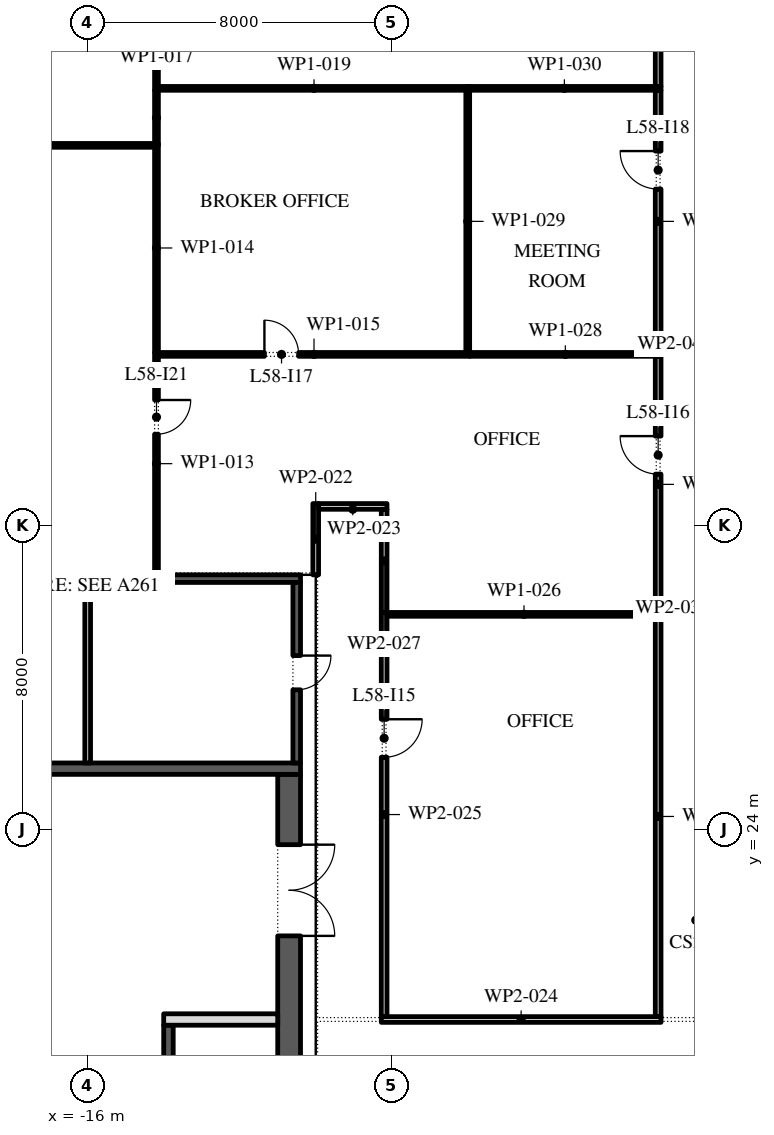
"""IFC4 building model, lengths in metres.
Left out: names, types, materials, properties, quantities, classifications, styles, units other than length and angle.
Written with IfcOpenShell. Run it as: python <this file> out.ifc"""

import sys

from ifc_helpers import new_model, si_unit, direction, frame, frame_2d, origin, place, context, subcontext, project, spatial, rectangle, extrude, element, fill, save


model = new_model("IFC4")
c1 = context("Model", 3, precision=1e-05, world=origin(), true_north=direction((0.0, 1.0)))
c2 = subcontext(c1, "Body", "Model", "MODEL_VIEW")
j1 = project(units=[si_unit("LENGTHUNIT", "METRE"), si_unit("PLANEANGLEUNIT", "RADIAN")], contexts=[c1])
p1 = place(None, origin())
s1 = spatial("IfcSite", under=j1, at=p1, CompositionType="ELEMENT")
p2 = place(p1, origin())
s2 = spatial("IfcBuilding", under=s1, at=p2, CompositionType="ELEMENT")
p3 = place(p2, frame((0.0, 0.0, 268.2)))
s3 = spatial("IfcBuildingStorey", under=s2, at=p3, CompositionType="ELEMENT", Elevation=268.2)
p4 = place(p3, frame((29.616, 40.758, 0.0), z_axis=(0.0, 0.0, 1.0), x_axis=(-0.974370532314, 0.224949029246, 0.0)))
e1 = element("IfcWall", 1, at=p4, inside=s3, PredefinedType="STANDARD", context=c2, shape_type="SweptSolid", body=[
    extrude(rectangle(XDim=48.0, YDim=0.3, at=frame_2d((24.0, 0.0))), origin(), (0.0, 0.0, 1.0), 4.0),
])
p5 = place(p4, frame((1.625, 0.0, 0.45)))
e2 = element("IfcOpeningElement", 2, at=p5, cuts=e1, PredefinedType="OPENING", context=c2, shape_type="SweptSolid", body=[
    extrude(rectangle(XDim=4.5, YDim=2.575, at=frame_2d((2.25, 1.288))), frame((0.0, 0.16, 0.0), z_axis=(0.0, -1.0, 0.0), x_axis=(1.0, 0.0, 0.0)), (0.0, 0.0, 1.0), 0.32),
])
p6 = place(p4, frame((10.575, 0.0, 0.0)))
e3 = element("IfcOpeningElement", 3, at=p6, cuts=e1, PredefinedType="OPENING", context=c2, shape_type="SweptSolid", body=[
    extrude(rectangle(XDim=2.4, YDim=3.5, at=frame_2d((1.2, 1.75))), frame((0.0, 0.16, 0.0), z_axis=(0.0, -1.0, 0.0), x_axis=(1.0, 0.0, 0.0)), (0.0, 0.0, 1.0), 0.32),
])
p7 = place(p4, frame((17.575, 0.0, 0.45)))
e4 = element("IfcOpeningElement", 4, at=p7, cuts=e1, PredefinedType="OPENING", context=c2, shape_type="SweptSolid", body=[
    extrude(rectangle(XDim=4.5, YDim=2.45, at=frame_2d((2.25, 1.225))), frame((0.0, 0.16, 0.0), z_axis=(0.0, -1.0, 0.0), x_axis=(1.0, 0.0, 0.0)), (0.0, 0.0, 1.0), 0.32),
])
p8 = place(p4, frame((25.625, 0.0, 0.45)))
e5 = element("IfcOpeningElement", 5, at=p8, cuts=e1, PredefinedType="OPENING", context=c2, shape_type="SweptSolid", body=[
    extrude(rectangle(XDim=4.5, YDim=2.45, at=frame_2d((2.25, 1.225))), frame((0.0, 0.16, 0.0), z_axis=(0.0, -1.0, 0.0), x_axis=(1.0, 0.0, 0.0)), (0.0, 0.0, 1.0), 0.32),
])
p9 = place(p4, frame((33.675, 0.0, 0.45)))
e6 = element("IfcOpeningElement", 6, at=p9, cuts=e1, PredefinedType="OPENING", context=c2, shape_type="SweptSolid", body=[
    extrude(rectangle(XDim=4.5, YDim=2.45, at=frame_2d((2.25, 1.225))), frame((0.0, 0.16, 0.0), z_axis=(0.0, -1.0, 0.0), x_axis=(1.0, 0.0, 0.0)), (0.0, 0.0, 1.0), 0.32),
])
p10 = place(p4, frame((42.175, 0.0, 0.0)))
e7 = element("IfcOpeningElement", 7, at=p10, cuts=e1, PredefinedType="OPENING", context=c2, shape_type="SweptSolid", body=[
    extrude(rectangle(XDim=2.4, YDim=3.5, at=frame_2d((1.2, 1.75))), frame((0.0, 0.16, 0.0), z_axis=(0.0, -1.0, 0.0), x_axis=(1.0, 0.0, 0.0)), (0.0, 0.0, 1.0), 0.32),
])
p11 = place(p3, frame((-10.7, -2.45, 0.0), z_axis=(0.0, 0.0, 1.0), x_axis=(0.0, 1.0, 0.0)))
e8 = element("IfcWall", 8, at=p11, inside=s3, PredefinedType="SHEAR", context=c2, shape_type="SweptSolid", body=[
    extrude(rectangle(XDim=27.9, YDim=0.6, at=frame_2d((13.95, 0.0))), origin(), (0.0, 0.0, 1.0), 4.0),
])
p12 = place(p11, frame((23.65, 0.0, 0.0)))
e9 = element("IfcOpeningElement", 9, at=p12, cuts=e8, PredefinedType="OPENING", context=c2, shape_type="SweptSolid", body=[
    extrude(rectangle(XDim=2.4, YDim=2.1, at=frame_2d((1.2, 1.05))), frame((0.0, 0.31, 0.0), z_axis=(0.0, -1.0, 0.0), x_axis=(1.0, 0.0, 0.0)), (0.0, 0.0, 1.0), 0.62),
])
p13 = place(p11, frame((1.087, 0.0, 0.0)))
e10 = element("IfcOpeningElement", 10, at=p13, cuts=e8, PredefinedType="OPENING", context=c2, shape_type="SweptSolid", body=[
    extrude(rectangle(XDim=0.9, YDim=2.1, at=frame_2d((0.45, 1.05))), frame((0.0, 0.31, 0.0), z_axis=(0.0, -1.0, 0.0), x_axis=(1.0, 0.0, 0.0)), (0.0, 0.0, 1.0), 0.62),
])
p14 = place(p11, frame((4.262, 0.0, 0.0)))
e11 = element("IfcOpeningElement", 11, at=p14, cuts=e8, PredefinedType="OPENING", context=c2, shape_type="SweptSolid", body=[
    extrude(rectangle(XDim=1.0, YDim=2.1, at=frame_2d((0.5, 1.05))), frame((0.0, 0.31, 0.0), z_axis=(0.0, -1.0, 0.0), x_axis=(1.0, 0.0, 0.0)), (0.0, 0.0, 1.0), 0.62),
])
p15 = place(p3, frame((-21.6, 25.6, 0.0), z_axis=(0.0, 0.0, 1.0), x_axis=(1.0, 0.0, 0.0)))
e12 = element("IfcWall", 12, at=p15, inside=s3, PredefinedType="SHEAR", context=c2, shape_type="SweptSolid", body=[
    extrude(rectangle(XDim=11.2, YDim=0.3, at=frame_2d((5.6, 0.0))), origin(), (0.0, 0.0, 1.0), 4.0),
])
p16 = place(p3, frame((-13.875, -2.45, 0.0), z_axis=(0.0, 0.0, 1.0), x_axis=(0.0, 1.0, 0.0)))
e13 = element("IfcWall", 13, at=p16, inside=s3, PredefinedType="SHEAR", context=c2, shape_type="SweptSolid", body=[
    extrude(rectangle(XDim=21.3, YDim=0.25, at=frame_2d((10.65, 0.0))), origin(), (0.0, 0.0, 1.0), 4.0),
])
p17 = place(p16, frame((16.261, 0.0, 0.0)))
e14 = element("IfcOpeningElement", 14, at=p17, cuts=e13, PredefinedType="OPENING", context=c2, shape_type="SweptSolid", body=[
    extrude(rectangle(XDim=0.9, YDim=2.1, at=frame_2d((0.45, 1.05))), frame((0.0, 0.135, 0.0), z_axis=(0.0, -1.0, 0.0), x_axis=(1.0, 0.0, 0.0)), (0.0, 0.0, 1.0), 0.27),
])
p18 = place(p16, frame((19.325, 0.0, 0.0)))
e15 = element("IfcOpeningElement", 15, at=p18, cuts=e13, PredefinedType="OPENING", context=c2, shape_type="SweptSolid", body=[
    extrude(rectangle(XDim=0.9, YDim=2.1, at=frame_2d((0.45, 1.05))), frame((0.0, 0.135, 0.0), z_axis=(0.0, -1.0, 0.0), x_axis=(1.0, 0.0, 0.0)), (0.0, 0.0, 1.0), 0.27),
])
p19 = place(p16, frame((6.971, 0.0, 0.0)))
e16 = element("IfcOpeningElement", 16, at=p19, cuts=e13, PredefinedType="OPENING", context=c2, shape_type="SweptSolid", body=[
    extrude(rectangle(XDim=1.1, YDim=2.1, at=frame_2d((0.55, 1.05))), frame((0.0, 0.135, 0.0), z_axis=(0.0, -1.0, 0.0), x_axis=(1.0, 0.0, 0.0)), (0.0, 0.0, 1.0), 0.27),
])
p20 = place(p16, frame((9.114, 0.0, 0.0)))
e17 = element("IfcOpeningElement", 17, at=p20, cuts=e13, PredefinedType="OPENING", context=c2, shape_type="SweptSolid", body=[
    extrude(rectangle(XDim=1.1, YDim=2.1, at=frame_2d((0.55, 1.05))), frame((0.0, 0.135, 0.0), z_axis=(0.0, -1.0, 0.0), x_axis=(1.0, 0.0, 0.0)), (0.0, 0.0, 1.0), 0.27),
])
p21 = place(p16, frame((11.257, 0.0, 0.0)))
e18 = element("IfcOpeningElement", 18, at=p21, cuts=e13, PredefinedType="OPENING", context=c2, shape_type="SweptSolid", body=[
    extrude(rectangle(XDim=1.1, YDim=2.1, at=frame_2d((0.55, 1.05))), frame((0.0, 0.135, 0.0), z_axis=(0.0, -1.0, 0.0), x_axis=(1.0, 0.0, 0.0)), (0.0, 0.0, 1.0), 0.27),
])
p22 = place(p16, frame((13.4, 0.0, 0.0)))
e19 = element("IfcOpeningElement", 19, at=p22, cuts=e13, PredefinedType="OPENING", context=c2, shape_type="SweptSolid", body=[
    extrude(rectangle(XDim=1.1, YDim=2.1, at=frame_2d((0.55, 1.05))), frame((0.0, 0.135, 0.0), z_axis=(0.0, -1.0, 0.0), x_axis=(1.0, 0.0, 0.0)), (0.0, 0.0, 1.0), 0.27),
])
p23 = place(p3, frame((-14.0, 19.0, 0.0), z_axis=(0.0, 0.0, 1.0), x_axis=(1.0, 0.0, 0.0)))
e20 = element("IfcWall", 20, at=p23, inside=s3, PredefinedType="PARTITIONING", context=c2, shape_type="SweptSolid", body=[
    extrude(rectangle(XDim=3.0, YDim=0.3, at=frame_2d((1.5, 0.0))), origin(), (0.0, 0.0, 1.0), 4.0),
])
p24 = place(p3, frame((-10.5, 25.75, 0.0), z_axis=(0.0, 0.0, 1.0), x_axis=(0.0, 1.0, 0.0)))
e21 = element("IfcWall", 21, at=p24, inside=s3, PredefinedType="SHEAR", context=c2, shape_type="SweptSolid", body=[
    extrude(rectangle(XDim=4.75, YDim=0.2, at=frame_2d((2.375, 0.0))), origin(), (0.0, 0.0, 1.0), 4.0),
])
p25 = place(p24, frame((1.925, 0.0, 0.0)))
e22 = element("IfcOpeningElement", 22, at=p25, cuts=e21, PredefinedType="OPENING", context=c2, shape_type="SweptSolid", body=[
    extrude(rectangle(XDim=0.9, YDim=2.1, at=frame_2d((0.45, 1.05))), frame((0.0, 0.11, 0.0), z_axis=(0.0, -1.0, 0.0), x_axis=(1.0, 0.0, 0.0)), (0.0, 0.0, 1.0), 0.22),
])
p26 = place(p3, frame((-21.6, 30.6, 0.0), z_axis=(0.0, 0.0, 1.0), x_axis=(1.0, 0.0, 0.0)))
e23 = element("IfcWall", 23, at=p26, inside=s3, PredefinedType="SHEAR", context=c2, shape_type="SweptSolid", body=[
    extrude(rectangle(XDim=11.2, YDim=0.2, at=frame_2d((5.6, 0.0))), origin(), (0.0, 0.0, 1.0), 4.0),
])
p27 = place(p3, frame((-16.0, 25.75, 0.0), z_axis=(0.0, 0.0, 1.0), x_axis=(0.0, 1.0, 0.0)))
e24 = element("IfcWall", 24, at=p27, inside=s3, PredefinedType="PARTITIONING", context=c2, shape_type="SweptSolid", body=[
    extrude(rectangle(XDim=4.75, YDim=0.15, at=frame_2d((2.375, 0.0))), origin(), (0.0, 0.0, 1.0), 4.0),
])
p28 = place(p3, frame((-14.19, 30.7, 0.0), z_axis=(0.0, 0.0, 1.0), x_axis=(0.0, 1.0, 0.0)))
e25 = element("IfcWall", 25, at=p28, inside=s3, PredefinedType="PARTITIONING", context=c2, shape_type="SweptSolid", body=[
    extrude(rectangle(XDim=5.85, YDim=0.1, at=frame_2d((2.925, 0.0))), origin(), (0.0, 0.0, 1.0), 4.0),
])
p29 = place(p28, frame((3.7, 0.0, 0.0)))
e26 = element("IfcOpeningElement", 26, at=p29, cuts=e25, PredefinedType="OPENING", context=c2, shape_type="SweptSolid", body=[
    extrude(rectangle(XDim=0.9, YDim=2.1, at=frame_2d((0.45, 1.05))), frame((0.0, 0.06, 0.0), z_axis=(0.0, -1.0, 0.0), x_axis=(1.0, 0.0, 0.0)), (0.0, 0.0, 1.0), 0.12),
])
p30 = place(p3, frame((-14.19, 36.55, 0.0), z_axis=(0.0, 0.0, 1.0), x_axis=(0.0, 1.0, 0.0)))
e27 = element("IfcWall", 27, at=p30, inside=s3, PredefinedType="PARTITIONING", context=c2, shape_type="SweptSolid", body=[
    extrude(rectangle(XDim=5.5, YDim=0.1, at=frame_2d((2.75, 0.0))), origin(), (0.0, 0.0, 1.0), 4.0),
])
p31 = place(p3, frame((-14.14, 36.5, 0.0), z_axis=(0.0, 0.0, 1.0), x_axis=(1.0, 0.0, 0.0)))
e28 = element("IfcWall", 28, at=p31, inside=s3, PredefinedType="PARTITIONING", context=c2, shape_type="SweptSolid", body=[
    extrude(rectangle(XDim=8.19, YDim=0.1, at=frame_2d((4.095, 0.0))), origin(), (0.0, 0.0, 1.0), 4.0),
])
p32 = place(p31, frame((2.79, 0.0, 0.0)))
e29 = element("IfcOpeningElement", 29, at=p32, cuts=e28, PredefinedType="OPENING", context=c2, shape_type="SweptSolid", body=[
    extrude(rectangle(XDim=0.9, YDim=2.1, at=frame_2d((0.45, 1.05))), frame((0.0, 0.06, 0.0), z_axis=(0.0, -1.0, 0.0), x_axis=(1.0, 0.0, 0.0)), (0.0, 0.0, 1.0), 0.12),
])
p33 = place(p3, frame((-14.24, 42.0, 0.0), z_axis=(0.0, 0.0, 1.0), x_axis=(-1.0, 0.0, 0.0)))
e30 = element("IfcWall", 30, at=p33, inside=s3, PredefinedType="PARTITIONING", context=c2, shape_type="SweptSolid", body=[
    extrude(rectangle(XDim=8.589, YDim=0.1, at=frame_2d((4.294, 0.0))), origin(), (0.0, 0.0, 1.0), 4.0),
])
p34 = place(p3, frame((-14.19, 42.0, 0.0), z_axis=(0.0, 0.0, 1.0), x_axis=(0.0, 1.0, 0.0)))
e31 = element("IfcWall", 31, at=p34, inside=s3, PredefinedType="PARTITIONING", context=c2, shape_type="SweptSolid", body=[
    extrude(rectangle(XDim=1.45, YDim=0.1, at=frame_2d((0.725, 0.0))), origin(), (0.0, 0.0, 1.0), 4.0),
])
p35 = place(p3, frame((-14.19, 43.45, 0.0), z_axis=(0.0, 0.0, 1.0), x_axis=(0.0, 1.0, 0.0)))
e32 = element("IfcWall", 32, at=p35, inside=s3, PredefinedType="PARTITIONING", context=c2, shape_type="SweptSolid", body=[
    extrude(rectangle(XDim=7.35, YDim=0.1, at=frame_2d((3.675, 0.0))), origin(), (0.0, 0.0, 1.0), 4.0),
])
p36 = place(p35, frame((1.98, 0.0, 0.0)))
e33 = element("IfcOpeningElement", 33, at=p36, cuts=e32, PredefinedType="OPENING", context=c2, shape_type="SweptSolid", body=[
    extrude(rectangle(XDim=0.9, YDim=2.1, at=frame_2d((0.45, 1.05))), frame((0.0, 0.06, 0.0), z_axis=(0.0, -1.0, 0.0), x_axis=(1.0, 0.0, 0.0)), (0.0, 0.0, 1.0), 0.12),
])
p37 = place(p3, frame((-14.14, 43.5, 0.0), z_axis=(0.0, 0.0, 1.0), x_axis=(1.0, 0.0, 0.0)))
e34 = element("IfcWall", 34, at=p37, inside=s3, PredefinedType="PARTITIONING", context=c2, shape_type="SweptSolid", body=[
    extrude(rectangle(XDim=8.19, YDim=0.1, at=frame_2d((4.095, 0.0))), origin(), (0.0, 0.0, 1.0), 4.0),
])
p38 = place(p3, frame((-10.0, 30.7, 0.0), z_axis=(0.0, 0.0, 1.0), x_axis=(0.0, 1.0, 0.0)))
e35 = element("IfcWall", 35, at=p38, inside=s3, PredefinedType="PARTITIONING", context=c2, shape_type="SweptSolid", body=[
    extrude(rectangle(XDim=1.875, YDim=0.15, at=frame_2d((0.938, 0.0))), origin(), (0.0, 0.0, 1.0), 4.0),
])
p39 = place(p3, frame((-9.925, 32.5, 0.0), z_axis=(0.0, 0.0, 1.0), x_axis=(1.0, 0.0, 0.0)))
e36 = element("IfcWall", 36, at=p39, inside=s3, PredefinedType="PARTITIONING", context=c2, shape_type="SweptSolid", body=[
    extrude(rectangle(XDim=1.8, YDim=0.15, at=frame_2d((0.9, 0.0))), origin(), (0.0, 0.0, 1.0), 4.0),
])
p40 = place(p3, frame((-8.275, 19.0, 0.0), z_axis=(0.0, 0.0, 1.0), x_axis=(1.0, 0.0, 0.0)))
e37 = element("IfcWall", 37, at=p40, inside=s3, PredefinedType="PARTITIONING", context=c2, shape_type="SweptSolid", body=[
    extrude(rectangle(XDim=7.36, YDim=0.15, at=frame_2d((3.68, 0.0))), origin(), (0.0, 0.0, 1.0), 4.0),
])
p41 = place(p3, frame((-8.2, 29.71, 0.0), z_axis=(0.0, 0.0, 1.0), x_axis=(0.0, -1.0, 0.0)))
e38 = element("IfcWall", 38, at=p41, inside=s3, PredefinedType="PARTITIONING", context=c2, shape_type="SweptSolid", body=[
    extrude(rectangle(XDim=10.635, YDim=0.15, at=frame_2d((5.317, 0.0))), origin(), (0.0, 0.0, 1.0), 4.0),
])
p42 = place(p41, frame((2.81, 0.0, 0.0)))
e39 = element("IfcOpeningElement", 39, at=p42, cuts=e38, PredefinedType="OPENING", context=c2, shape_type="SweptSolid", body=[
    extrude(rectangle(XDim=1.0, YDim=2.1, at=frame_2d((0.5, 1.05))), frame((0.0, 0.085, 0.0), z_axis=(0.0, -1.0, 0.0), x_axis=(1.0, 0.0, 0.0)), (0.0, 0.0, 1.0), 0.17),
])
p43 = place(p3, frame((-8.125, 29.66, 0.0), z_axis=(0.0, 0.0, 1.0), x_axis=(1.0, 0.0, 0.0)))
e40 = element("IfcWall", 40, at=p43, inside=s3, PredefinedType="PARTITIONING", context=c2, shape_type="SweptSolid", body=[
    extrude(rectangle(XDim=7.21, YDim=0.1, at=frame_2d((3.605, 0.0))), origin(), (0.0, 0.0, 1.0), 4.0),
])
p44 = place(p3, frame((-8.2, 32.425, 0.0), z_axis=(0.0, 0.0, 1.0), x_axis=(0.0, -1.0, 0.0)))
e41 = element("IfcWall", 41, at=p44, inside=s3, PredefinedType="PARTITIONING", context=c2, shape_type="SweptSolid", body=[
    extrude(rectangle(XDim=2.715, YDim=0.15, at=frame_2d((1.357, 0.0))), origin(), (0.0, 0.0, 1.0), 4.0),
])
p45 = place(p3, frame((-5.95, 36.5, 0.0), z_axis=(0.0, 0.0, 1.0), x_axis=(1.0, 0.0, 0.0)))
e42 = element("IfcWall", 42, at=p45, inside=s3, PredefinedType="PARTITIONING", context=c2, shape_type="SweptSolid", body=[
    extrude(rectangle(XDim=5.035, YDim=0.1, at=frame_2d((2.518, 0.0))), origin(), (0.0, 0.0, 1.0), 4.0),
])
p46 = place(p3, frame((-6.0, 43.45, 0.0), z_axis=(0.0, 0.0, 1.0), x_axis=(0.0, -1.0, 0.0)))
e43 = element("IfcWall", 43, at=p46, inside=s3, PredefinedType="PARTITIONING", context=c2, shape_type="SweptSolid", body=[
    extrude(rectangle(XDim=6.9, YDim=0.1, at=frame_2d((3.45, 0.0))), origin(), (0.0, 0.0, 1.0), 4.0),
])
p47 = place(p3, frame((-6.0, 43.5, 0.0), z_axis=(0.0, 0.0, 1.0), x_axis=(1.0, 0.0, 0.0)))
e44 = element("IfcWall", 44, at=p47, inside=s3, PredefinedType="PARTITIONING", context=c2, shape_type="SweptSolid", body=[
    extrude(rectangle(XDim=5.085, YDim=0.1, at=frame_2d((2.542, 0.0))), origin(), (0.0, 0.0, 1.0), 4.0),
])
p48 = place(p3, frame((-0.99, 19.075, 0.0), z_axis=(0.0, 0.0, 1.0), x_axis=(0.0, 1.0, 0.0)))
e45 = element("IfcWall", 45, at=p48, inside=s3, PredefinedType="PARTITIONING", context=c2, shape_type="SweptSolid", body=[
    extrude(rectangle(XDim=10.535, YDim=0.15, at=frame_2d((5.268, 0.0))), origin(), (0.0, 0.0, 1.0), 4.0),
])
p49 = place(p3, frame((-0.99, 29.71, 0.0), z_axis=(0.0, 0.0, 1.0), x_axis=(0.0, 1.0, 0.0)))
e46 = element("IfcWall", 46, at=p49, inside=s3, PredefinedType="PARTITIONING", context=c2, shape_type="SweptSolid", body=[
    extrude(rectangle(XDim=6.74, YDim=0.15, at=frame_2d((3.37, 0.0))), origin(), (0.0, 0.0, 1.0), 4.0),
])
p50 = place(p49, frame((3.64, 0.0, 0.0)))
e47 = element("IfcOpeningElement", 47, at=p50, cuts=e46, PredefinedType="OPENING", context=c2, shape_type="SweptSolid", body=[
    extrude(rectangle(XDim=1.0, YDim=2.1, at=frame_2d((0.5, 1.05))), frame((0.0, 0.085, 0.0), z_axis=(0.0, -1.0, 0.0), x_axis=(1.0, 0.0, 0.0)), (0.0, 0.0, 1.0), 0.17),
])
p51 = place(p3, frame((-0.99, 36.55, 0.0), z_axis=(0.0, 0.0, 1.0), x_axis=(0.0, 1.0, 0.0)))
e48 = element("IfcWall", 48, at=p51, inside=s3, PredefinedType="PARTITIONING", context=c2, shape_type="SweptSolid", body=[
    extrude(rectangle(XDim=6.9, YDim=0.15, at=frame_2d((3.45, 0.0))), origin(), (0.0, 0.0, 1.0), 4.0),
])
p52 = place(p51, frame((4.3, 0.0, 0.0)))
e49 = element("IfcOpeningElement", 49, at=p52, cuts=e48, PredefinedType="OPENING", context=c2, shape_type="SweptSolid", body=[
    extrude(rectangle(XDim=1.0, YDim=2.1, at=frame_2d((0.5, 1.05))), frame((0.0, 0.085, 0.0), z_axis=(0.0, -1.0, 0.0), x_axis=(1.0, 0.0, 0.0)), (0.0, 0.0, 1.0), 0.17),
])
p53 = place(p3, frame((-0.99, 43.55, 0.0), z_axis=(0.0, 0.0, 1.0), x_axis=(0.0, 1.0, 0.0)))
e50 = element("IfcWall", 50, at=p53, inside=s3, PredefinedType="PARTITIONING", context=c2, shape_type="SweptSolid", body=[
    extrude(rectangle(XDim=4.203, YDim=0.15, at=frame_2d((2.102, 0.0))), origin(), (0.0, 0.0, 1.0), 4.0),
])
p54 = place(p53, frame((2.53, 0.0, 0.0)))
e51 = element("IfcOpeningElement", 51, at=p54, cuts=e50, PredefinedType="OPENING", context=c2, shape_type="SweptSolid", body=[
    extrude(rectangle(XDim=1.0, YDim=2.1, at=frame_2d((0.5, 1.05))), frame((0.0, 0.085, 0.0), z_axis=(0.0, -1.0, 0.0), x_axis=(1.0, 0.0, 0.0)), (0.0, 0.0, 1.0), 0.17),
])
p55 = place(p12, frame((2.4, 0.0, 0.0), z_axis=(0.0, 0.0, 1.0), x_axis=(-1.0, 0.0, 0.0)))
e52 = element("IfcDoor", 52, at=p55, inside=s3, OperationType="DOUBLE_DOOR_SINGLE_SWING", PredefinedType="DOOR", context=c2, shape_type="SweptSolid", body=[
    extrude(rectangle(XDim=2.4, YDim=2.1, at=frame_2d((1.2, 1.05))), frame((0.0, 0.025, 0.0), z_axis=(0.0, -1.0, 0.0), x_axis=(1.0, 0.0, 0.0)), (0.0, 0.0, 1.0), 0.05),
])
fill(e9, e52)
p56 = place(p25, frame((0.9, 0.15, 0.0), z_axis=(0.0, 0.0, 1.0), x_axis=(-1.0, 0.0, 0.0)))
e53 = element("IfcDoor", 53, at=p56, inside=s3, OperationType="SINGLE_SWING_RIGHT", PredefinedType="DOOR", context=c2, shape_type="SweptSolid", body=[
    extrude(rectangle(XDim=0.9, YDim=2.1, at=frame_2d((0.45, 1.05))), frame((0.0, 0.1, 0.0), z_axis=(0.0, -1.0, 0.0), x_axis=(1.0, 0.0, 0.0)), (0.0, 0.0, 1.0), 0.05),
])
fill(e22, e53)
p57 = place(p42, origin())
e54 = element("IfcDoor", 54, at=p57, inside=s3, OperationType="SINGLE_SWING_RIGHT", PredefinedType="DOOR", context=c2, shape_type="SweptSolid", body=[
    extrude(rectangle(XDim=1.0, YDim=2.1, at=frame_2d((0.5, 1.05))), frame((0.0, 0.025, 0.0), z_axis=(0.0, -1.0, 0.0), x_axis=(1.0, 0.0, 0.0)), (0.0, 0.0, 1.0), 0.05),
])
fill(e39, e54)
p58 = place(p50, origin())
e55 = element("IfcDoor", 55, at=p58, inside=s3, OperationType="SINGLE_SWING_LEFT", PredefinedType="DOOR", context=c2, shape_type="SweptSolid", body=[
    extrude(rectangle(XDim=1.0, YDim=2.1, at=frame_2d((0.5, 1.05))), frame((0.0, 0.025, 0.0), z_axis=(0.0, -1.0, 0.0), x_axis=(1.0, 0.0, 0.0)), (0.0, 0.0, 1.0), 0.05),
])
fill(e47, e55)
p59 = place(p32, origin())
e56 = element("IfcDoor", 56, at=p59, inside=s3, OperationType="SINGLE_SWING_RIGHT", PredefinedType="DOOR", context=c2, shape_type="SweptSolid", body=[
    extrude(rectangle(XDim=0.9, YDim=2.1, at=frame_2d((0.45, 1.05))), frame((0.0, 0.025, 0.0), z_axis=(0.0, -1.0, 0.0), x_axis=(1.0, 0.0, 0.0)), (0.0, 0.0, 1.0), 0.05),
])
fill(e29, e56)
p60 = place(p52, origin())
e57 = element("IfcDoor", 57, at=p60, inside=s3, OperationType="SINGLE_SWING_LEFT", PredefinedType="DOOR", context=c2, shape_type="SweptSolid", body=[
    extrude(rectangle(XDim=1.0, YDim=2.1, at=frame_2d((0.5, 1.05))), frame((0.0, 0.025, 0.0), z_axis=(0.0, -1.0, 0.0), x_axis=(1.0, 0.0, 0.0)), (0.0, 0.0, 1.0), 0.05),
])
fill(e49, e57)
p61 = place(p29, frame((0.9, 0.0, 0.0), z_axis=(0.0, 0.0, 1.0), x_axis=(-1.0, 0.0, 0.0)))
e58 = element("IfcDoor", 58, at=p61, inside=s3, OperationType="SINGLE_SWING_RIGHT", PredefinedType="DOOR", context=c2, shape_type="SweptSolid", body=[
    extrude(rectangle(XDim=0.9, YDim=2.1, at=frame_2d((0.45, 1.05))), frame((0.0, 0.025, 0.0), z_axis=(0.0, -1.0, 0.0), x_axis=(1.0, 0.0, 0.0)), (0.0, 0.0, 1.0), 0.05),
])
fill(e26, e58)
save(model, sys.argv[1])
